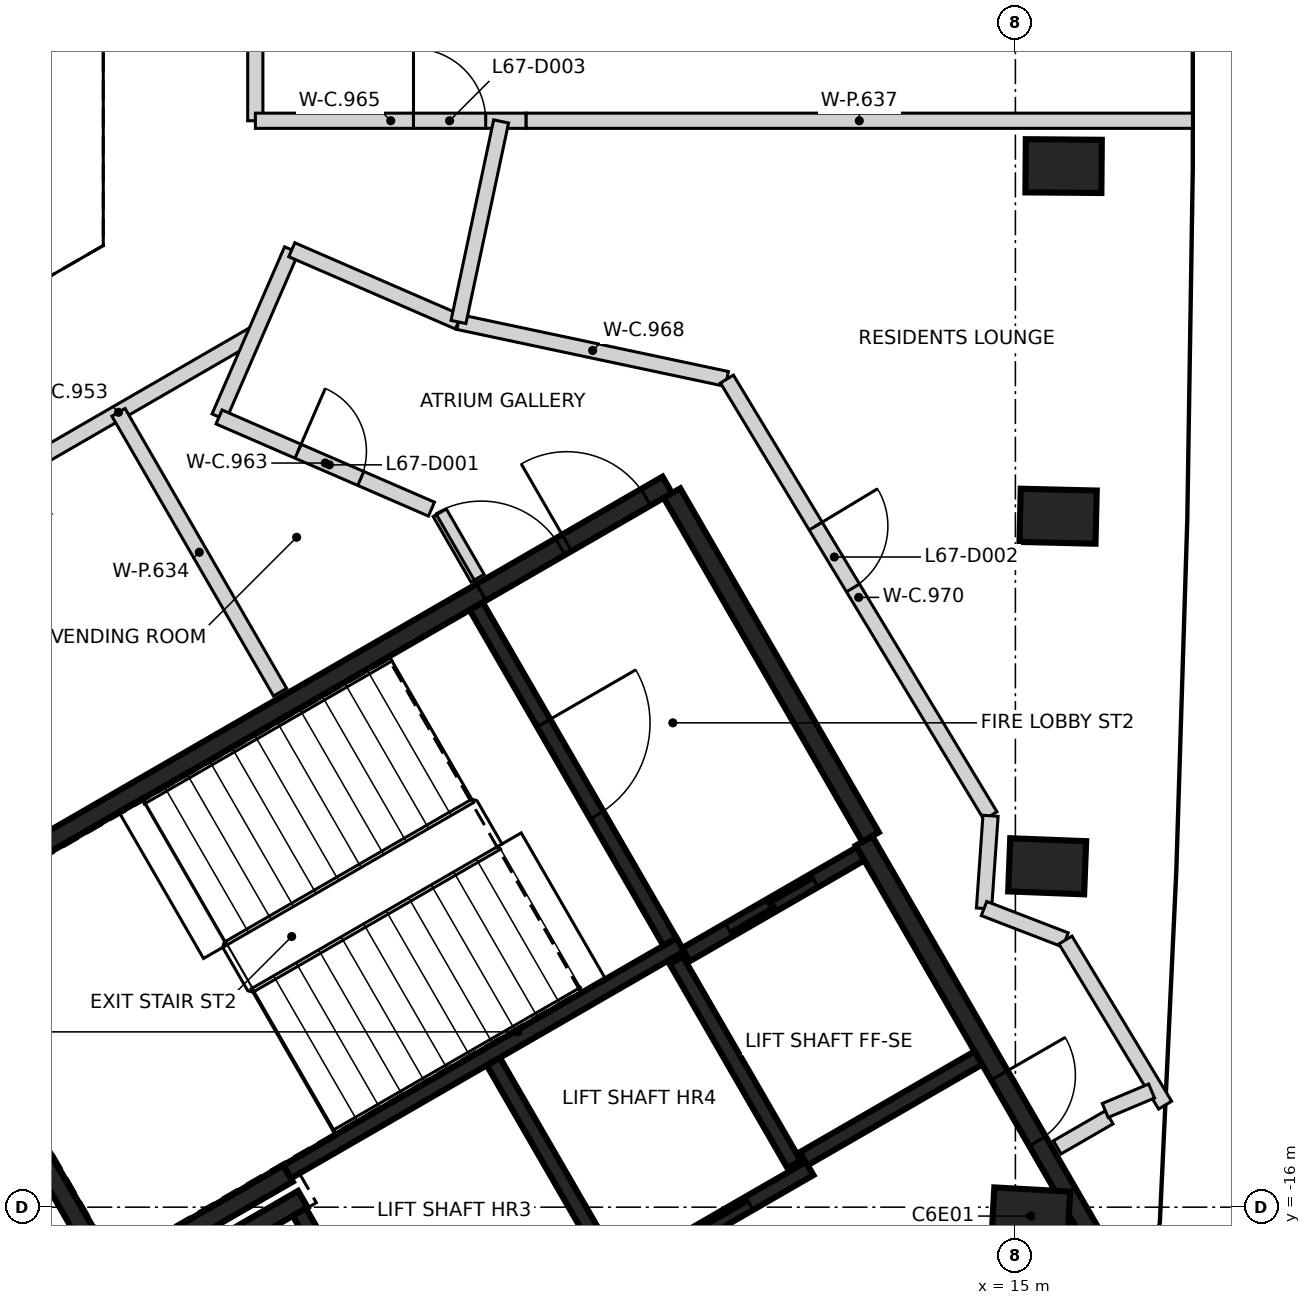
"""IFC4 building model, lengths in metres.
Left out: names, types, materials, properties, quantities, classifications, styles, units other than length and angle.
Written with IfcOpenShell. Run it as: python <this file> out.ifc"""

import sys

from ifc_helpers import new_model, si_unit, direction, frame, frame_2d, origin, origin_2d, place, context, subcontext, project, spatial, rectangle, extrude, element, fill, save


model = new_model("IFC4")
c1 = context("Model", 3, precision=1e-05, world=origin(), true_north=direction((0.0, 1.0)))
c2 = subcontext(c1, "Body", "Model", "MODEL_VIEW")
j1 = project(units=[si_unit("LENGTHUNIT", "METRE"), si_unit("PLANEANGLEUNIT", "RADIAN")], contexts=[c1])
p1 = place(None, origin())
s1 = spatial("IfcSite", under=j1, at=p1, CompositionType="ELEMENT")
p2 = place(p1, origin())
s2 = spatial("IfcBuilding", under=s1, at=p2, CompositionType="ELEMENT")
p3 = place(p2, frame((0.0, 0.0, 265.8)))
s3 = spatial("IfcBuildingStorey", under=s2, at=p3, CompositionType="ELEMENT", Elevation=265.8)
for number, where, z_axis, x_axis in (
    (1, (15.202, -16.117, -0.35), (0.0, 0.0, 1.0), (-0.998, 0.055, 0.0)),
    (2, (15.418, -11.515, -0.35), (0.0, 0.0, 1.0), (-0.999, 0.039, 0.0)),
    (3, (15.562, -6.91, -0.35), (0.0, 0.0, 1.0), (-1.0, 0.024, 0.0)),
    (4, (15.634, -2.303, -0.35), (0.0, 0.0, 1.0), (-1.0, 0.008, 0.0)),
):
    element("IfcColumn", number, at=place(p3, frame(where, z_axis=z_axis, x_axis=x_axis)), inside=s3, PredefinedType="COLUMN", context=c2, shape_type="SweptSolid", body=[
        extrude(rectangle(XDim=1.0, YDim=0.7, at=origin_2d()), origin(), (0.0, 0.0, 1.0), 3.6),
    ])
p4 = place(p3, frame((0.417, -12.273, 0.0), z_axis=(0.0, 0.0, 1.0), x_axis=(0.866021906294, 0.500006057782, 0.0)))
e5 = element("IfcWall", 5, at=p4, inside=s3, PredefinedType="SHEAR", context=c2, shape_type="SweptSolid", body=[
    extrude(rectangle(XDim=11.55, YDim=0.25, at=frame_2d((5.775, 0.0))), origin(), (0.0, 0.0, 1.0), 3.25),
])
p5 = place(p4, frame((10.025, 0.0, 0.0)))
e6 = element("IfcOpeningElement", 6, at=p5, cuts=e5, PredefinedType="OPENING", context=c2, shape_type="SweptSolid", body=[
    extrude(rectangle(XDim=1.2, YDim=2.1, at=frame_2d((0.6, 1.05))), frame((0.0, 0.135, 0.0), z_axis=(0.0, -1.0, 0.0), x_axis=(1.0, 0.0, 0.0)), (0.0, 0.0, 1.0), 0.27),
])
p6 = place(p4, frame((8.725, 0.0, 0.0)))
e7 = element("IfcOpeningElement", 7, at=p6, cuts=e5, PredefinedType="OPENING", context=c2, shape_type="SweptSolid", body=[
    extrude(rectangle(XDim=1.2, YDim=2.1, at=frame_2d((0.6, 1.05))), frame((0.0, 0.135, 0.0), z_axis=(0.0, -1.0, 0.0), x_axis=(1.0, 0.0, 0.0)), (0.0, 0.0, 1.0), 0.27),
])
p7 = place(p3, frame((13.008, -11.181, 0.0), z_axis=(0.0, 0.0, 1.0), x_axis=(0.500001955336, -0.866024274868, 0.0)))
e8 = element("IfcWall", 8, at=p7, inside=s3, PredefinedType="SHEAR", context=c2, shape_type="SweptSolid", body=[
    extrude(rectangle(XDim=6.125, YDim=0.25, at=frame_2d((3.062, 0.0))), origin(), (0.0, 0.0, 1.0), 3.25),
])
p8 = place(p7, frame((3.563, 0.0, 0.0)))
e9 = element("IfcOpeningElement", 9, at=p8, cuts=e8, PredefinedType="OPENING", context=c2, shape_type="SweptSolid", body=[
    extrude(rectangle(XDim=1.0, YDim=2.1, at=frame_2d((0.5, 1.05))), frame((0.0, 0.135, 0.0), z_axis=(0.0, -1.0, 0.0), x_axis=(1.0, 0.0, 0.0)), (0.0, 0.0, 1.0), 0.27),
])
p9 = place(p3, frame((3.235, -17.153, 0.0), z_axis=(0.0, 0.0, 1.0), x_axis=(-0.500008851346, 0.866020293397, 0.0)))
e10 = element("IfcWall", 10, at=p9, inside=s3, PredefinedType="SHEAR", context=c2, shape_type="SweptSolid", body=[
    extrude(rectangle(XDim=5.51, YDim=0.25, at=frame_2d((2.755, 0.0))), origin(), (0.0, 0.0, 1.0), 3.25),
])
p10 = place(p3, frame((10.483, -6.606, 0.0), z_axis=(0.0, 0.0, 1.0), x_axis=(0.49999885962, -0.866026062182, 0.0)))
e11 = element("IfcWall", 11, at=p10, inside=s3, PredefinedType="SHEAR", context=c2, shape_type="SweptSolid", body=[
    extrude(rectangle(XDim=5.225, YDim=0.25, at=frame_2d((2.612, 0.0))), origin(), (0.0, 0.0, 1.0), 3.25),
])
p11 = place(p3, frame((5.431, -15.556, 0.0), z_axis=(0.0, 0.0, 1.0), x_axis=(-0.866022940537, -0.500004266446, 0.0)))
e12 = element("IfcWall", 12, at=p11, inside=s3, PredefinedType="SHEAR", context=c2, shape_type="SweptSolid", body=[
    extrude(rectangle(XDim=2.575, YDim=0.25, at=frame_2d((1.287, 0.0))), origin(), (0.0, 0.0, 1.0), 3.25),
])
p12 = place(p3, frame((4.145, -16.749, 0.0), z_axis=(0.0, 0.0, 1.0), x_axis=(0.866038183914, 0.499977863513, 0.0)))
e13 = element("IfcWall", 13, at=p12, inside=s3, PredefinedType="SHEAR", context=c2, shape_type="SweptSolid", body=[
    extrude(rectangle(XDim=1.71, YDim=0.25, at=frame_2d((0.855, 0.0))), origin(), (0.0, 0.0, 1.0), 3.25),
])
p13 = place(p3, frame((5.419, -15.534, 0.0), z_axis=(0.0, 0.0, 1.0), x_axis=(0.866029065029, 0.499993658486, 0.0)))
e14 = element("IfcWall", 14, at=p13, inside=s3, PredefinedType="SHEAR", context=c2, shape_type="SweptSolid", body=[
    extrude(rectangle(XDim=5.974, YDim=0.2, at=frame_2d((2.987, 0.0))), origin(), (0.0, 0.0, 1.0), 3.25),
])
p14 = place(p3, frame((7.01, -18.542, 0.0), z_axis=(0.0, 0.0, 1.0), x_axis=(0.866030299012, 0.499991521122, 0.0)))
e15 = element("IfcWall", 15, at=p14, inside=s3, PredefinedType="SHEAR", context=c2, shape_type="SweptSolid", body=[
    extrude(rectangle(XDim=6.1, YDim=0.2, at=frame_2d((3.05, 0.0))), origin(), (0.0, 0.0, 1.0), 3.25),
])
p15 = place(p14, frame((1.0, 0.0, 0.0)))
e16 = element("IfcOpeningElement", 16, at=p15, cuts=e15, PredefinedType="OPENING", context=c2, shape_type="SweptSolid", body=[
    extrude(rectangle(XDim=1.2, YDim=2.1, at=frame_2d((0.6, 1.05))), frame((0.0, 0.11, 0.0), z_axis=(0.0, -1.0, 0.0), x_axis=(1.0, 0.0, 0.0)), (0.0, 0.0, 1.0), 0.22),
])
p16 = place(p14, frame((3.982, 0.0, 0.0)))
e17 = element("IfcOpeningElement", 17, at=p16, cuts=e15, PredefinedType="OPENING", context=c2, shape_type="SweptSolid", body=[
    extrude(rectangle(XDim=1.2, YDim=2.1, at=frame_2d((0.6, 1.05))), frame((0.0, 0.11, 0.0), z_axis=(0.0, -1.0, 0.0), x_axis=(1.0, 0.0, 0.0)), (0.0, 0.0, 1.0), 0.22),
])
p17 = place(p3, frame((7.906, -8.094, 0.0), z_axis=(0.0, 0.0, 1.0), x_axis=(0.500027839223, -0.866009330205, 0.0)))
e18 = element("IfcWall", 18, at=p17, inside=s3, PredefinedType="SHEAR", context=c2, shape_type="SweptSolid", body=[
    extrude(rectangle(XDim=5.098, YDim=0.2, at=frame_2d((2.549, 0.0))), origin(), (0.0, 0.0, 1.0), 3.25),
])
p18 = place(p17, frame((1.774, 0.0, 0.0)))
e19 = element("IfcOpeningElement", 19, at=p18, cuts=e18, PredefinedType="OPENING", context=c2, shape_type="SweptSolid", body=[
    extrude(rectangle(XDim=1.4, YDim=2.1, at=frame_2d((0.7, 1.05))), frame((0.0, 0.11, 0.0), z_axis=(0.0, -1.0, 0.0), x_axis=(1.0, 0.0, 0.0)), (0.0, 0.0, 1.0), 0.22),
])
p19 = place(p3, frame((8.132, -14.084, 0.0), z_axis=(0.0, 0.0, 1.0), x_axis=(0.499997778408, -0.866026686418, 0.0)))
e20 = element("IfcWall", 20, at=p19, inside=s3, PredefinedType="SHEAR", context=c2, shape_type="SweptSolid", body=[
    extrude(rectangle(XDim=3.198, YDim=0.2, at=frame_2d((1.599, 0.0))), origin(), (0.0, 0.0, 1.0), 3.25),
])
p20 = place(p3, frame((6.96, -18.455, 0.0), z_axis=(0.0, 0.0, 1.0), x_axis=(-0.499926705758, 0.866067716099, 0.0)))
e21 = element("IfcWall", 21, at=p20, inside=s3, PredefinedType="SHEAR", context=c2, shape_type="SweptSolid", body=[
    extrude(rectangle(XDim=2.759, YDim=0.2, at=frame_2d((1.38, 0.0))), origin(), (0.0, 0.0, 1.0), 3.25),
])
p21 = place(p3, frame((12.088, -15.437, 0.0), z_axis=(0.0, 0.0, 1.0), x_axis=(-0.500026960575, 0.86600983753, 0.0)))
e22 = element("IfcWall", 22, at=p21, inside=s3, PredefinedType="SHEAR", context=c2, shape_type="SweptSolid", body=[
    extrude(rectangle(XDim=3.1, YDim=0.2, at=frame_2d((1.55, 0.0))), origin(), (0.0, 0.0, 1.0), 3.25),
])
p22 = place(p3, frame((10.666, -12.678, 0.0), z_axis=(0.0, 0.0, 1.0), x_axis=(0.866018407898, 0.500012117035, 0.0)))
e23 = element("IfcWall", 23, at=p22, inside=s3, PredefinedType="SHEAR", context=c2, shape_type="SweptSolid", body=[
    extrude(rectangle(XDim=2.651, YDim=0.2, at=frame_2d((1.325, 0.0))), origin(), (0.0, 0.0, 1.0), 3.25),
])
p23 = place(p22, frame((0.652, 0.0, 0.0)))
e24 = element("IfcOpeningElement", 24, at=p23, cuts=e23, PredefinedType="OPENING", context=c2, shape_type="SweptSolid", body=[
    extrude(rectangle(XDim=1.3, YDim=2.1, at=frame_2d((0.65, 1.05))), frame((0.0, 0.11, 0.0), z_axis=(0.0, -1.0, 0.0), x_axis=(1.0, 0.0, 0.0)), (0.0, 0.0, 1.0), 0.22),
])
p24 = place(p3, frame((14.512, -14.037, 0.0), z_axis=(0.0, 0.0, 1.0), x_axis=(-0.866018407898, -0.500012117035, 0.0)))
e25 = element("IfcWall", 25, at=p24, inside=s3, PredefinedType="SHEAR", context=c2, shape_type="SweptSolid", body=[
    extrude(rectangle(XDim=2.651, YDim=0.2, at=frame_2d((1.325, 0.0))), origin(), (0.0, 0.0, 1.0), 3.25),
])
p25 = place(p3, frame((1.401, -6.583, 0.0), z_axis=(0.0, 0.0, 1.0), x_axis=(0.865818713766, 0.500357826853, 0.0)))
e26 = element("IfcWall", 26, at=p25, inside=s3, PredefinedType="PARTITIONING", context=c2, shape_type="SweptSolid", body=[
    extrude(rectangle(XDim=4.157, YDim=0.2, at=frame_2d((2.079, 0.0))), origin(), (0.0, 0.0, 1.0), 3.25),
])
p26 = place(p3, frame((4.523, -5.604, 0.0), z_axis=(0.0, 0.0, 1.0), x_axis=(0.398033282066, 0.917370975324, 0.0)))
e27 = element("IfcWall", 27, at=p26, inside=s3, PredefinedType="PARTITIONING", context=c2, shape_type="SweptSolid", body=[
    extrude(rectangle(XDim=2.397, YDim=0.2, at=frame_2d((1.198, 0.0))), origin(), (0.0, 0.0, 1.0), 3.25),
])
p27 = place(p3, frame((4.523, -5.604, 0.0), z_axis=(0.0, 0.0, 1.0), x_axis=(0.917390838441, -0.397987499231, 0.0)))
e28 = element("IfcWall", 28, at=p27, inside=s3, PredefinedType="PARTITIONING", context=c2, shape_type="SweptSolid", body=[
    extrude(rectangle(XDim=3.046, YDim=0.2, at=frame_2d((1.523, 0.0))), origin(), (0.0, 0.0, 1.0), 3.25),
])
p28 = place(p27, frame((1.133, 0.0, 0.0)))
e29 = element("IfcOpeningElement", 29, at=p28, cuts=e28, PredefinedType="OPENING", context=c2, shape_type="SweptSolid", body=[
    extrude(rectangle(XDim=0.9, YDim=2.1, at=frame_2d((0.45, 1.05))), frame((0.0, 0.11, 0.0), z_axis=(0.0, -1.0, 0.0), x_axis=(1.0, 0.0, 0.0)), (0.0, 0.0, 1.0), 0.22),
])
p29 = place(p3, frame((5.0, -1.707, 0.0), z_axis=(0.0, 0.0, 1.0), x_axis=(0.0, 1.0, 0.0)))
e30 = element("IfcWall", 30, at=p29, inside=s3, PredefinedType="PARTITIONING", context=c2, shape_type="SweptSolid", body=[
    extrude(rectangle(XDim=6.211, YDim=0.2, at=frame_2d((3.105, 0.0))), origin(), (0.0, 0.0, 1.0), 3.25),
])
p30 = place(p29, frame((4.605, 0.0, 0.0)))
e31 = element("IfcOpeningElement", 31, at=p30, cuts=e30, PredefinedType="OPENING", context=c2, shape_type="SweptSolid", body=[
    extrude(rectangle(XDim=1.0, YDim=2.1, at=frame_2d((0.5, 1.05))), frame((0.0, 0.11, 0.0), z_axis=(0.0, -1.0, 0.0), x_axis=(1.0, 0.0, 0.0)), (0.0, 0.0, 1.0), 0.22),
])
p31 = place(p3, frame((5.001, -1.707, 0.0), z_axis=(0.0, 0.0, 1.0), x_axis=(1.0, 0.0, 0.0)))
e32 = element("IfcWall", 32, at=p31, inside=s3, PredefinedType="PARTITIONING", context=c2, shape_type="SweptSolid", body=[
    extrude(rectangle(XDim=3.562, YDim=0.2, at=frame_2d((1.781, 0.0))), origin(), (0.0, 0.0, 1.0), 3.25),
])
p32 = place(p31, frame((2.08, 0.0, 0.0)))
e33 = element("IfcOpeningElement", 33, at=p32, cuts=e32, PredefinedType="OPENING", context=c2, shape_type="SweptSolid", body=[
    extrude(rectangle(XDim=0.95, YDim=2.1, at=frame_2d((0.475, 1.05))), frame((0.0, 0.11, 0.0), z_axis=(0.0, -1.0, 0.0), x_axis=(1.0, 0.0, 0.0)), (0.0, 0.0, 1.0), 0.22),
])
p33 = place(p3, frame((5.48, -3.404, 0.0), z_axis=(0.0, 0.0, 1.0), x_axis=(0.917402729571, -0.39796008817, 0.0)))
e34 = element("IfcWall", 34, at=p33, inside=s3, PredefinedType="PARTITIONING", context=c2, shape_type="SweptSolid", body=[
    extrude(rectangle(XDim=2.389, YDim=0.2, at=frame_2d((1.195, 0.0))), origin(), (0.0, 0.0, 1.0), 3.25),
])
p34 = place(p3, frame((7.427, -6.864, 0.0), z_axis=(0.0, 0.0, 1.0), x_axis=(0.499942098031, -0.866058830921, 0.0)))
e35 = element("IfcWall", 35, at=p34, inside=s3, PredefinedType="PARTITIONING", context=c2, shape_type="SweptSolid", body=[
    extrude(rectangle(XDim=0.994, YDim=0.2, at=frame_2d((0.497, 0.0))), origin(), (0.0, 0.0, 1.0), 3.25),
])
p35 = place(p3, frame((7.673, -4.355, 0.0), z_axis=(0.0, 0.0, 1.0), x_axis=(0.978232876952, -0.207510092407, 0.0)))
e36 = element("IfcWall", 36, at=p35, inside=s3, PredefinedType="PARTITIONING", context=c2, shape_type="SweptSolid", body=[
    extrude(rectangle(XDim=3.61, YDim=0.2, at=frame_2d((1.805, 0.0))), origin(), (0.0, 0.0, 1.0), 3.25),
])
p36 = place(p3, frame((7.673, -4.354, 0.0), z_axis=(0.0, 0.0, 1.0), x_axis=(0.207939957157, 0.978141592111, 0.0)))
e37 = element("IfcWall", 37, at=p36, inside=s3, PredefinedType="PARTITIONING", context=c2, shape_type="SweptSolid", body=[
    extrude(rectangle(XDim=2.697, YDim=0.2, at=frame_2d((1.348, 0.0))), origin(), (0.0, 0.0, 1.0), 3.25),
])
p37 = place(p3, frame((11.205, -5.105, 0.0), z_axis=(0.0, 0.0, 1.0), x_axis=(0.516682442017, -0.856177116087, 0.0)))
e38 = element("IfcWall", 38, at=p37, inside=s3, PredefinedType="PARTITIONING", context=c2, shape_type="SweptSolid", body=[
    extrude(rectangle(XDim=6.71, YDim=0.2, at=frame_2d((3.355, 0.0))), origin(), (0.0, 0.0, 1.0), 3.25),
])
p38 = place(p37, frame((2.26, 0.0, 0.0)))
e39 = element("IfcOpeningElement", 39, at=p38, cuts=e38, PredefinedType="OPENING", context=c2, shape_type="SweptSolid", body=[
    extrude(rectangle(XDim=0.95, YDim=2.1, at=frame_2d((0.475, 1.05))), frame((0.0, 0.11, 0.0), z_axis=(0.0, -1.0, 0.0), x_axis=(1.0, 0.0, 0.0)), (0.0, 0.0, 1.0), 0.22),
])
p39 = place(p3, frame((14.587, -12.071, 0.0), z_axis=(0.0, 0.0, 1.0), x_axis=(0.070466777423, 0.997514126857, 0.0)))
e40 = element("IfcWall", 40, at=p39, inside=s3, PredefinedType="PARTITIONING", context=c2, shape_type="SweptSolid", body=[
    extrude(rectangle(XDim=1.223, YDim=0.2, at=frame_2d((0.611, 0.0))), origin(), (0.0, 0.0, 1.0), 3.25),
])
p40 = place(p3, frame((14.587, -12.071, 0.0), z_axis=(0.0, 0.0, 1.0), x_axis=(0.933192153307, -0.359377802606, 0.0)))
e41 = element("IfcWall", 41, at=p40, inside=s3, PredefinedType="PARTITIONING", context=c2, shape_type="SweptSolid", body=[
    extrude(rectangle(XDim=1.149, YDim=0.2, at=frame_2d((0.574, 0.0))), origin(), (0.0, 0.0, 1.0), 2.35),
])
p41 = place(p3, frame((15.55, -15.213, 0.0), z_axis=(0.0, 0.0, 1.0), x_axis=(0.865989998118, 0.500061319399, 0.0)))
e42 = element("IfcWall", 42, at=p41, inside=s3, PredefinedType="PARTITIONING", context=c2, shape_type="SweptSolid", body=[
    extrude(rectangle(XDim=0.79, YDim=0.2, at=frame_2d((0.395, 0.0))), origin(), (0.0, 0.0, 1.0), 3.25),
])
p42 = place(p3, frame((15.659, -12.485, 0.0), z_axis=(0.0, 0.0, 1.0), x_axis=(0.516729412104, -0.856148769003, 0.0)))
e43 = element("IfcWall", 43, at=p42, inside=s3, PredefinedType="PARTITIONING", context=c2, shape_type="SweptSolid", body=[
    extrude(rectangle(XDim=2.538, YDim=0.2, at=frame_2d((1.269, 0.0))), origin(), (0.0, 0.0, 1.0), 3.25),
])
p43 = place(p3, frame((16.182, -14.728, 0.0), z_axis=(0.0, 0.0, 1.0), x_axis=(0.922058491377, 0.387050563207, 0.0)))
e44 = element("IfcWall", 44, at=p43, inside=s3, PredefinedType="PARTITIONING", context=c2, shape_type="SweptSolid", body=[
    extrude(rectangle(XDim=0.662, YDim=0.2, at=frame_2d((0.331, 0.0))), origin(), (0.0, 0.0, 1.0), 3.25),
])
p44 = place(p3, frame((3.2, -5.543, 0.0), z_axis=(0.0, 0.0, 1.0), x_axis=(0.500060428066, -0.865990512813, 0.0)))
e45 = element("IfcWall", 45, at=p44, inside=s3, PredefinedType="PARTITIONING", context=c2, shape_type="SweptSolid", body=[
    extrude(rectangle(XDim=4.252, YDim=0.2, at=frame_2d((2.126, 0.0))), origin(), (0.0, 0.0, 1.0), 3.25),
])
p45 = place(p3, frame((8.564, -1.707, 0.0), z_axis=(0.0, 0.0, 1.0), x_axis=(1.0, 0.0, 0.0)))
e46 = element("IfcWall", 46, at=p45, inside=s3, PredefinedType="PARTITIONING", context=c2, shape_type="SweptSolid", body=[
    extrude(rectangle(XDim=8.765, YDim=0.2, at=frame_2d((4.383, 0.0))), origin(), (0.0, 0.0, 1.0), 2.35),
])
p46 = place(p23, origin())
e47 = element("IfcDoor", 47, at=p46, inside=s3, OperationType="SLIDING_TO_LEFT", PredefinedType="DOOR", context=c2, shape_type="SweptSolid", body=[
    extrude(rectangle(XDim=1.3, YDim=2.1, at=frame_2d((0.65, 1.05))), frame((0.0, 0.025, 0.0), z_axis=(0.0, -1.0, 0.0), x_axis=(1.0, 0.0, 0.0)), (0.0, 0.0, 1.0), 0.05),
])
fill(e24, e47)
p47 = place(p16, origin())
e48 = element("IfcDoor", 48, at=p47, inside=s3, OperationType="DOUBLE_DOOR_SLIDING", PredefinedType="DOOR", context=c2, shape_type="SweptSolid", body=[
    extrude(rectangle(XDim=1.2, YDim=2.1, at=frame_2d((0.6, 1.05))), frame((0.0, 0.025, 0.0), z_axis=(0.0, -1.0, 0.0), x_axis=(1.0, 0.0, 0.0)), (0.0, 0.0, 1.0), 0.05),
])
fill(e17, e48)
p48 = place(p8, origin())
e49 = element("IfcDoor", 49, at=p48, inside=s3, OperationType="SINGLE_SWING_LEFT", PredefinedType="DOOR", context=c2, shape_type="SweptSolid", body=[
    extrude(rectangle(XDim=1.0, YDim=2.1, at=frame_2d((0.5, 1.05))), frame((0.0, 0.025, 0.0), z_axis=(0.0, -1.0, 0.0), x_axis=(1.0, 0.0, 0.0)), (0.0, 0.0, 1.0), 0.05),
])
fill(e9, e49)
p49 = place(p5, origin())
e50 = element("IfcDoor", 50, at=p49, inside=s3, OperationType="SINGLE_SWING_LEFT", PredefinedType="DOOR", context=c2, shape_type="SweptSolid", body=[
    extrude(rectangle(XDim=1.2, YDim=2.1, at=frame_2d((0.6, 1.05))), frame((0.0, 0.025, 0.0), z_axis=(0.0, -1.0, 0.0), x_axis=(1.0, 0.0, 0.0)), (0.0, 0.0, 1.0), 0.05),
])
fill(e6, e50)
p50 = place(p6, origin())
e51 = element("IfcDoor", 51, at=p50, inside=s3, OperationType="SINGLE_SWING_RIGHT", PredefinedType="DOOR", context=c2, shape_type="SweptSolid", body=[
    extrude(rectangle(XDim=1.2, YDim=2.1, at=frame_2d((0.6, 1.05))), frame((0.0, 0.025, 0.0), z_axis=(0.0, -1.0, 0.0), x_axis=(1.0, 0.0, 0.0)), (0.0, 0.0, 1.0), 0.05),
])
fill(e7, e51)
p51 = place(p18, origin())
e52 = element("IfcDoor", 52, at=p51, inside=s3, OperationType="SINGLE_SWING_LEFT", PredefinedType="DOOR", context=c2, shape_type="SweptSolid", body=[
    extrude(rectangle(XDim=1.4, YDim=2.1, at=frame_2d((0.7, 1.05))), frame((0.0, 0.025, 0.0), z_axis=(0.0, -1.0, 0.0), x_axis=(1.0, 0.0, 0.0)), (0.0, 0.0, 1.0), 0.05),
])
fill(e19, e52)
p52 = place(p28, frame((0.9, 0.0, 0.0), z_axis=(0.0, 0.0, 1.0), x_axis=(-1.0, 0.0, 0.0)))
e53 = element("IfcDoor", 53, at=p52, inside=s3, OperationType="SINGLE_SWING_LEFT", PredefinedType="DOOR", context=c2, shape_type="SweptSolid", body=[
    extrude(rectangle(XDim=0.9, YDim=2.1, at=frame_2d((0.45, 1.05))), frame((0.0, 0.025, 0.0), z_axis=(0.0, -1.0, 0.0), x_axis=(1.0, 0.0, 0.0)), (0.0, 0.0, 1.0), 0.05),
])
fill(e29, e53)
p53 = place(p38, origin())
e54 = element("IfcDoor", 54, at=p53, inside=s3, OperationType="SINGLE_SWING_LEFT", PredefinedType="DOOR", context=c2, shape_type="SweptSolid", body=[
    extrude(rectangle(XDim=0.95, YDim=2.1, at=frame_2d((0.475, 1.05))), frame((0.0, 0.025, 0.0), z_axis=(0.0, -1.0, 0.0), x_axis=(1.0, 0.0, 0.0)), (0.0, 0.0, 1.0), 0.05),
])
fill(e39, e54)
p54 = place(p32, origin())
e55 = element("IfcDoor", 55, at=p54, inside=s3, OperationType="SINGLE_SWING_LEFT", PredefinedType="DOOR", context=c2, shape_type="SweptSolid", body=[
    extrude(rectangle(XDim=0.95, YDim=2.1, at=frame_2d((0.475, 1.05))), frame((0.0, 0.025, 0.0), z_axis=(0.0, -1.0, 0.0), x_axis=(1.0, 0.0, 0.0)), (0.0, 0.0, 1.0), 0.05),
])
fill(e33, e55)
save(model, sys.argv[1])
